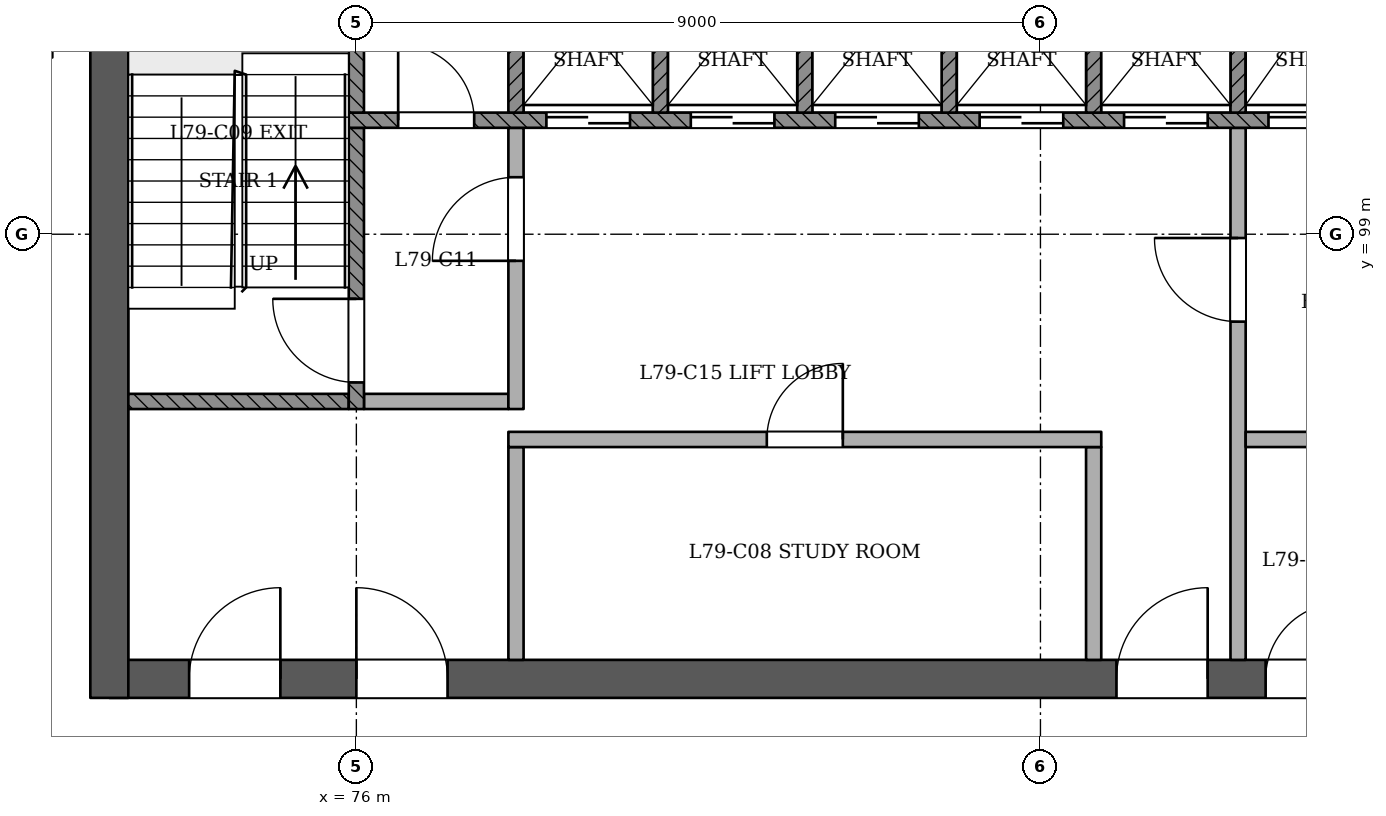
"""IFC4 building model, lengths in metres.
Left out: names, types, materials, properties, quantities, classifications, styles, units other than length and angle.
Written with IfcOpenShell. Run it as: python <this file> out.ifc"""

import sys

from ifc_helpers import new_model, si_unit, direction, frame, frame_2d, origin, place, context, subcontext, project, spatial, rectangle, extrude, element, fill, save


model = new_model("IFC4")
c1 = context("Model", 3, precision=1e-05, world=origin(), true_north=direction((0.0, 1.0)))
c2 = subcontext(c1, "Body", "Model", "MODEL_VIEW")
j1 = project(units=[si_unit("LENGTHUNIT", "METRE"), si_unit("PLANEANGLEUNIT", "RADIAN")], contexts=[c1])
p1 = place(None, origin())
s1 = spatial("IfcSite", under=j1, at=p1, CompositionType="ELEMENT")
p2 = place(p1, origin())
s2 = spatial("IfcBuilding", under=s1, at=p2, CompositionType="ELEMENT")
p3 = place(p2, frame((0.0, 0.0, 305.8)))
s3 = spatial("IfcBuildingStorey", under=s2, at=p3, CompositionType="ELEMENT", Elevation=305.8)
p4 = place(p3, frame((72.75, 93.15, 0.0), z_axis=(0.0, 0.0, 1.0), x_axis=(1.0, 0.0, 0.0)))
e1 = element("IfcWall", 1, at=p4, inside=s3, PredefinedType="SHEAR", context=c2, shape_type="SweptSolid", body=[
    extrude(rectangle(XDim=24.75, YDim=0.5, at=frame_2d((12.375, 0.0))), origin(), (0.0, 0.0, 1.0), 3.6),
])
p5 = place(p4, frame((1.05, 0.0, 0.0)))
e2 = element("IfcOpeningElement", 2, at=p5, cuts=e1, PredefinedType="OPENING", context=c2, shape_type="SweptSolid", body=[
    extrude(rectangle(XDim=1.2, YDim=2.1, at=frame_2d((0.6, 1.05))), frame((0.0, 0.26, 0.0), z_axis=(0.0, -1.0, 0.0), x_axis=(1.0, 0.0, 0.0)), (0.0, 0.0, 1.0), 0.521),
])
p6 = place(p4, frame((3.25, 0.0, 0.0)))
e3 = element("IfcOpeningElement", 3, at=p6, cuts=e1, PredefinedType="OPENING", context=c2, shape_type="SweptSolid", body=[
    extrude(rectangle(XDim=1.2, YDim=2.1, at=frame_2d((0.6, 1.05))), frame((0.0, 0.26, 0.0), z_axis=(0.0, -1.0, 0.0), x_axis=(1.0, 0.0, 0.0)), (0.0, 0.0, 1.0), 0.521),
])
p7 = place(p4, frame((13.25, 0.0, 0.0)))
e4 = element("IfcOpeningElement", 4, at=p7, cuts=e1, PredefinedType="OPENING", context=c2, shape_type="SweptSolid", body=[
    extrude(rectangle(XDim=1.2, YDim=2.1, at=frame_2d((0.6, 1.05))), frame((0.0, 0.26, 0.0), z_axis=(0.0, -1.0, 0.0), x_axis=(1.0, 0.0, 0.0)), (0.0, 0.0, 1.0), 0.521),
])
p8 = place(p4, frame((15.212, 0.0, 0.0)))
e5 = element("IfcOpeningElement", 5, at=p8, cuts=e1, PredefinedType="OPENING", context=c2, shape_type="SweptSolid", body=[
    extrude(rectangle(XDim=1.0, YDim=2.1, at=frame_2d((0.5, 1.05))), frame((0.0, 0.26, 0.0), z_axis=(0.0, -1.0, 0.0), x_axis=(1.0, 0.0, 0.0)), (0.0, 0.0, 1.0), 0.521),
])
p9 = place(p4, frame((18.05, 0.0, 0.0)))
e6 = element("IfcOpeningElement", 6, at=p9, cuts=e1, PredefinedType="OPENING", context=c2, shape_type="SweptSolid", body=[
    extrude(rectangle(XDim=1.0, YDim=2.1, at=frame_2d((0.5, 1.05))), frame((0.0, 0.26, 0.0), z_axis=(0.0, -1.0, 0.0), x_axis=(1.0, 0.0, 0.0)), (0.0, 0.0, 1.0), 0.521),
])
p10 = place(p4, frame((20.95, 0.0, 0.0)))
e7 = element("IfcOpeningElement", 7, at=p10, cuts=e1, PredefinedType="OPENING", context=c2, shape_type="SweptSolid", body=[
    extrude(rectangle(XDim=1.0, YDim=2.1, at=frame_2d((0.5, 1.05))), frame((0.0, 0.26, 0.0), z_axis=(0.0, -1.0, 0.0), x_axis=(1.0, 0.0, 0.0)), (0.0, 0.0, 1.0), 0.521),
])
p11 = place(p4, frame((22.837, 0.0, 0.0)))
e8 = element("IfcOpeningElement", 8, at=p11, cuts=e1, PredefinedType="OPENING", context=c2, shape_type="SweptSolid", body=[
    extrude(rectangle(XDim=1.0, YDim=2.1, at=frame_2d((0.5, 1.05))), frame((0.0, 0.26, 0.0), z_axis=(0.0, -1.0, 0.0), x_axis=(1.0, 0.0, 0.0)), (0.0, 0.0, 1.0), 0.521),
])
p12 = place(p3, frame((72.75, 103.65, 0.0), z_axis=(0.0, 0.0, 1.0), x_axis=(0.0, -1.0, 0.0)))
e9 = element("IfcWall", 9, at=p12, inside=s3, PredefinedType="SHEAR", context=c2, shape_type="SweptSolid", body=[
    extrude(rectangle(XDim=10.75, YDim=0.5, at=frame_2d((5.375, 0.0))), origin(), (0.0, 0.0, 1.0), 3.6),
])
for number, where, z_axis, x_axis in (
    (10, (78.1, 93.4, 0.0), (0.0, 0.0, 1.0), (0.0, 1.0, 0.0)),
    (11, (85.7, 93.4, 0.0), (0.0, 0.0, 1.0), (0.0, 1.0, 0.0)),
):
    element("IfcWall", number, at=place(p3, frame(where, z_axis=z_axis, x_axis=x_axis)), inside=s3, PredefinedType="PARTITIONING", context=c2, shape_type="SweptSolid", body=[
        extrude(rectangle(XDim=2.8, YDim=0.2, at=frame_2d((1.4, 0.0))), origin(), (0.0, 0.0, 1.0), 3.2),
    ])
p13 = place(p3, frame((87.6, 93.4, 0.0), z_axis=(0.0, 0.0, 1.0), x_axis=(0.0, 1.0, 0.0)))
e12 = element("IfcWall", 12, at=p13, inside=s3, PredefinedType="PARTITIONING", context=c2, shape_type="SweptSolid", body=[
    extrude(rectangle(XDim=7.0, YDim=0.2, at=frame_2d((3.5, 0.0))), origin(), (0.0, 0.0, 1.0), 3.2),
])
p14 = place(p13, frame((4.45, 0.0, 0.0)))
e13 = element("IfcOpeningElement", 13, at=p14, cuts=e12, PredefinedType="OPENING", context=c2, shape_type="SweptSolid", body=[
    extrude(rectangle(XDim=1.1, YDim=2.1, at=frame_2d((0.55, 1.05))), frame((0.0, 0.11, 0.0), z_axis=(0.0, -1.0, 0.0), x_axis=(1.0, 0.0, 0.0)), (0.0, 0.0, 1.0), 0.221),
])
p15 = place(p3, frame((78.0, 96.3, 0.0), z_axis=(0.0, 0.0, 1.0), x_axis=(1.0, 0.0, 0.0)))
e14 = element("IfcWall", 14, at=p15, inside=s3, PredefinedType="PARTITIONING", context=c2, shape_type="SweptSolid", body=[
    extrude(rectangle(XDim=7.8, YDim=0.2, at=frame_2d((3.9, 0.0))), origin(), (0.0, 0.0, 1.0), 3.2),
])
p16 = place(p15, frame((3.4, 0.0, 0.0)))
e15 = element("IfcOpeningElement", 15, at=p16, cuts=e14, PredefinedType="OPENING", context=c2, shape_type="SweptSolid", body=[
    extrude(rectangle(XDim=1.0, YDim=2.1, at=frame_2d((0.5, 1.05))), frame((0.0, 0.11, 0.0), z_axis=(0.0, -1.0, 0.0), x_axis=(1.0, 0.0, 0.0)), (0.0, 0.0, 1.0), 0.221),
])
p17 = place(p3, frame((87.7, 96.3, 0.0), z_axis=(0.0, 0.0, 1.0), x_axis=(1.0, 0.0, 0.0)))
e16 = element("IfcWall", 16, at=p17, inside=s3, PredefinedType="PARTITIONING", context=c2, shape_type="SweptSolid", body=[
    extrude(rectangle(XDim=3.6, YDim=0.2, at=frame_2d((1.8, 0.0))), origin(), (0.0, 0.0, 1.0), 3.2),
])
p18 = place(p3, frame((73.0, 96.8, 0.0), z_axis=(0.0, 0.0, 1.0), x_axis=(1.0, 0.0, 0.0)))
e17 = element("IfcWall", 17, at=p18, inside=s3, PredefinedType="SOLIDWALL", context=c2, shape_type="SweptSolid", body=[
    extrude(rectangle(XDim=2.9, YDim=0.2, at=frame_2d((1.45, 0.0))), origin(), (0.0, 0.0, 1.0), 3.2),
])
p19 = place(p3, frame((76.0, 96.7, 0.0), z_axis=(0.0, 0.0, 1.0), x_axis=(0.0, 1.0, 0.0)))
e18 = element("IfcWall", 18, at=p19, inside=s3, PredefinedType="SOLIDWALL", context=c2, shape_type="SweptSolid", body=[
    extrude(rectangle(XDim=3.7, YDim=0.2, at=frame_2d((1.85, 0.0))), origin(), (0.0, 0.0, 1.0), 3.2),
])
p20 = place(p19, frame((0.35, 0.0, 0.0)))
e19 = element("IfcOpeningElement", 19, at=p20, cuts=e18, PredefinedType="OPENING", context=c2, shape_type="SweptSolid", body=[
    extrude(rectangle(XDim=1.1, YDim=2.1, at=frame_2d((0.55, 1.05))), frame((0.0, 0.11, 0.0), z_axis=(0.0, -1.0, 0.0), x_axis=(1.0, 0.0, 0.0)), (0.0, 0.0, 1.0), 0.221),
])
p21 = place(p3, frame((76.1, 96.8, 0.0), z_axis=(0.0, 0.0, 1.0), x_axis=(1.0, 0.0, 0.0)))
e20 = element("IfcWall", 20, at=p21, inside=s3, PredefinedType="PARTITIONING", context=c2, shape_type="SweptSolid", body=[
    extrude(rectangle(XDim=1.9, YDim=0.2, at=frame_2d((0.95, 0.0))), origin(), (0.0, 0.0, 1.0), 3.2),
])
p22 = place(p3, frame((78.1, 96.7, 0.0), z_axis=(0.0, 0.0, 1.0), x_axis=(0.0, 1.0, 0.0)))
e21 = element("IfcWall", 21, at=p22, inside=s3, PredefinedType="PARTITIONING", context=c2, shape_type="SweptSolid", body=[
    extrude(rectangle(XDim=3.7, YDim=0.2, at=frame_2d((1.85, 0.0))), origin(), (0.0, 0.0, 1.0), 3.2),
])
p23 = place(p22, frame((1.95, 0.0, 0.0)))
e22 = element("IfcOpeningElement", 22, at=p23, cuts=e21, PredefinedType="OPENING", context=c2, shape_type="SweptSolid", body=[
    extrude(rectangle(XDim=1.1, YDim=2.1, at=frame_2d((0.55, 1.05))), frame((0.0, 0.11, 0.0), z_axis=(0.0, -1.0, 0.0), x_axis=(1.0, 0.0, 0.0)), (0.0, 0.0, 1.0), 0.221),
])
p24 = place(p3, frame((75.9, 100.5, 0.0), z_axis=(0.0, 0.0, 1.0), x_axis=(1.0, 0.0, 0.0)))
e23 = element("IfcWall", 23, at=p24, inside=s3, PredefinedType="SOLIDWALL", context=c2, shape_type="SweptSolid", body=[
    extrude(rectangle(XDim=18.2, YDim=0.2, at=frame_2d((9.1, 0.0))), origin(), (0.0, 0.0, 1.0), 3.2),
])
p25 = place(p24, frame((2.6, 0.0, 0.0)))
e24 = element("IfcOpeningElement", 24, at=p25, cuts=e23, PredefinedType="OPENING", context=c2, shape_type="SweptSolid", body=[
    extrude(rectangle(XDim=1.1, YDim=2.1, at=frame_2d((0.55, 1.05))), frame((0.0, 0.11, 0.0), z_axis=(0.0, -1.0, 0.0), x_axis=(1.0, 0.0, 0.0)), (0.0, 0.0, 1.0), 0.221),
])
p26 = place(p24, frame((4.5, 0.0, 0.0)))
e25 = element("IfcOpeningElement", 25, at=p26, cuts=e23, PredefinedType="OPENING", context=c2, shape_type="SweptSolid", body=[
    extrude(rectangle(XDim=1.1, YDim=2.1, at=frame_2d((0.55, 1.05))), frame((0.0, 0.11, 0.0), z_axis=(0.0, -1.0, 0.0), x_axis=(1.0, 0.0, 0.0)), (0.0, 0.0, 1.0), 0.221),
])
p27 = place(p24, frame((6.4, 0.0, 0.0)))
e26 = element("IfcOpeningElement", 26, at=p27, cuts=e23, PredefinedType="OPENING", context=c2, shape_type="SweptSolid", body=[
    extrude(rectangle(XDim=1.1, YDim=2.1, at=frame_2d((0.55, 1.05))), frame((0.0, 0.11, 0.0), z_axis=(0.0, -1.0, 0.0), x_axis=(1.0, 0.0, 0.0)), (0.0, 0.0, 1.0), 0.221),
])
p28 = place(p24, frame((8.3, 0.0, 0.0)))
e27 = element("IfcOpeningElement", 27, at=p28, cuts=e23, PredefinedType="OPENING", context=c2, shape_type="SweptSolid", body=[
    extrude(rectangle(XDim=1.1, YDim=2.1, at=frame_2d((0.55, 1.05))), frame((0.0, 0.11, 0.0), z_axis=(0.0, -1.0, 0.0), x_axis=(1.0, 0.0, 0.0)), (0.0, 0.0, 1.0), 0.221),
])
p29 = place(p24, frame((10.2, 0.0, 0.0)))
e28 = element("IfcOpeningElement", 28, at=p29, cuts=e23, PredefinedType="OPENING", context=c2, shape_type="SweptSolid", body=[
    extrude(rectangle(XDim=1.1, YDim=2.1, at=frame_2d((0.55, 1.05))), frame((0.0, 0.11, 0.0), z_axis=(0.0, -1.0, 0.0), x_axis=(1.0, 0.0, 0.0)), (0.0, 0.0, 1.0), 0.221),
])
p30 = place(p24, frame((12.1, 0.0, 0.0)))
e29 = element("IfcOpeningElement", 29, at=p30, cuts=e23, PredefinedType="OPENING", context=c2, shape_type="SweptSolid", body=[
    extrude(rectangle(XDim=1.1, YDim=2.1, at=frame_2d((0.55, 1.05))), frame((0.0, 0.11, 0.0), z_axis=(0.0, -1.0, 0.0), x_axis=(1.0, 0.0, 0.0)), (0.0, 0.0, 1.0), 0.221),
])
p31 = place(p24, frame((14.0, 0.0, 0.0)))
e30 = element("IfcOpeningElement", 30, at=p31, cuts=e23, PredefinedType="OPENING", context=c2, shape_type="SweptSolid", body=[
    extrude(rectangle(XDim=1.1, YDim=2.1, at=frame_2d((0.55, 1.05))), frame((0.0, 0.11, 0.0), z_axis=(0.0, -1.0, 0.0), x_axis=(1.0, 0.0, 0.0)), (0.0, 0.0, 1.0), 0.221),
])
p32 = place(p24, frame((0.65, 0.0, 0.0)))
e31 = element("IfcOpeningElement", 31, at=p32, cuts=e23, PredefinedType="OPENING", context=c2, shape_type="SweptSolid", body=[
    extrude(rectangle(XDim=1.0, YDim=2.1, at=frame_2d((0.5, 1.05))), frame((0.0, 0.11, 0.0), z_axis=(0.0, -1.0, 0.0), x_axis=(1.0, 0.0, 0.0)), (0.0, 0.0, 1.0), 0.221),
])
p33 = place(p24, frame((16.3, 0.0, 0.0)))
e32 = element("IfcOpeningElement", 32, at=p33, cuts=e23, PredefinedType="OPENING", context=c2, shape_type="SweptSolid", body=[
    extrude(rectangle(XDim=1.0, YDim=2.1, at=frame_2d((0.5, 1.05))), frame((0.0, 0.11, 0.0), z_axis=(0.0, -1.0, 0.0), x_axis=(1.0, 0.0, 0.0)), (0.0, 0.0, 1.0), 0.221),
])
for number, where, z_axis, x_axis in (
    (33, (76.0, 100.6, 0.0), (0.0, 0.0, 1.0), (0.0, 1.0, 0.0)),
    (34, (78.1, 100.6, 0.0), (0.0, 0.0, 1.0), (0.0, 1.0, 0.0)),
    (35, (80.0, 100.6, 0.0), (0.0, 0.0, 1.0), (0.0, 1.0, 0.0)),
    (36, (81.9, 100.6, 0.0), (0.0, 0.0, 1.0), (0.0, 1.0, 0.0)),
    (37, (83.8, 100.6, 0.0), (0.0, 0.0, 1.0), (0.0, 1.0, 0.0)),
    (38, (85.7, 100.6, 0.0), (0.0, 0.0, 1.0), (0.0, 1.0, 0.0)),
    (39, (87.6, 100.6, 0.0), (0.0, 0.0, 1.0), (0.0, 1.0, 0.0)),
):
    element("IfcWall", number, at=place(p3, frame(where, z_axis=z_axis, x_axis=x_axis)), inside=s3, PredefinedType="SOLIDWALL", context=c2, shape_type="SweptSolid", body=[
        extrude(rectangle(XDim=2.8, YDim=0.2, at=frame_2d((1.4, 0.0))), origin(), (0.0, 0.0, 1.0), 3.2),
    ])
p34 = place(p25, origin())
e40 = element("IfcDoor", 40, at=p34, inside=s3, OperationType="SLIDING_TO_RIGHT", PredefinedType="NOTDEFINED", context=c2, shape_type="SweptSolid", body=[
    extrude(rectangle(XDim=1.1, YDim=2.1, at=frame_2d((0.55, 1.05))), frame((0.0, 0.025, 0.0), z_axis=(0.0, -1.0, 0.0), x_axis=(1.0, 0.0, 0.0)), (0.0, 0.0, 1.0), 0.05),
])
fill(e24, e40)
p35 = place(p26, origin())
e41 = element("IfcDoor", 41, at=p35, inside=s3, OperationType="SLIDING_TO_LEFT", PredefinedType="NOTDEFINED", context=c2, shape_type="SweptSolid", body=[
    extrude(rectangle(XDim=1.1, YDim=2.1, at=frame_2d((0.55, 1.05))), frame((0.0, 0.025, 0.0), z_axis=(0.0, -1.0, 0.0), x_axis=(1.0, 0.0, 0.0)), (0.0, 0.0, 1.0), 0.05),
])
fill(e25, e41)
p36 = place(p27, origin())
e42 = element("IfcDoor", 42, at=p36, inside=s3, OperationType="SLIDING_TO_RIGHT", PredefinedType="NOTDEFINED", context=c2, shape_type="SweptSolid", body=[
    extrude(rectangle(XDim=1.1, YDim=2.1, at=frame_2d((0.55, 1.05))), frame((0.0, 0.025, 0.0), z_axis=(0.0, -1.0, 0.0), x_axis=(1.0, 0.0, 0.0)), (0.0, 0.0, 1.0), 0.05),
])
fill(e26, e42)
p37 = place(p28, origin())
e43 = element("IfcDoor", 43, at=p37, inside=s3, OperationType="SLIDING_TO_LEFT", PredefinedType="NOTDEFINED", context=c2, shape_type="SweptSolid", body=[
    extrude(rectangle(XDim=1.1, YDim=2.1, at=frame_2d((0.55, 1.05))), frame((0.0, 0.025, 0.0), z_axis=(0.0, -1.0, 0.0), x_axis=(1.0, 0.0, 0.0)), (0.0, 0.0, 1.0), 0.05),
])
fill(e27, e43)
p38 = place(p29, origin())
e44 = element("IfcDoor", 44, at=p38, inside=s3, OperationType="SLIDING_TO_RIGHT", PredefinedType="NOTDEFINED", context=c2, shape_type="SweptSolid", body=[
    extrude(rectangle(XDim=1.1, YDim=2.1, at=frame_2d((0.55, 1.05))), frame((0.0, 0.025, 0.0), z_axis=(0.0, -1.0, 0.0), x_axis=(1.0, 0.0, 0.0)), (0.0, 0.0, 1.0), 0.05),
])
fill(e28, e44)
p39 = place(p30, origin())
e45 = element("IfcDoor", 45, at=p39, inside=s3, OperationType="SLIDING_TO_RIGHT", PredefinedType="NOTDEFINED", context=c2, shape_type="SweptSolid", body=[
    extrude(rectangle(XDim=1.1, YDim=2.1, at=frame_2d((0.55, 1.05))), frame((0.0, 0.025, 0.0), z_axis=(0.0, -1.0, 0.0), x_axis=(1.0, 0.0, 0.0)), (0.0, 0.0, 1.0), 0.05),
])
fill(e29, e45)
p40 = place(p20, origin())
e46 = element("IfcDoor", 46, at=p40, inside=s3, OperationType="SINGLE_SWING_RIGHT", PredefinedType="NOTDEFINED", context=c2, shape_type="SweptSolid", body=[
    extrude(rectangle(XDim=1.1, YDim=2.1, at=frame_2d((0.55, 1.05))), frame((0.0, 0.025, 0.0), z_axis=(0.0, -1.0, 0.0), x_axis=(1.0, 0.0, 0.0)), (0.0, 0.0, 1.0), 0.05),
])
fill(e19, e46)
p41 = place(p23, origin())
e47 = element("IfcDoor", 47, at=p41, inside=s3, OperationType="SINGLE_SWING_LEFT", PredefinedType="NOTDEFINED", context=c2, shape_type="SweptSolid", body=[
    extrude(rectangle(XDim=1.1, YDim=2.1, at=frame_2d((0.55, 1.05))), frame((0.0, 0.025, 0.0), z_axis=(0.0, -1.0, 0.0), x_axis=(1.0, 0.0, 0.0)), (0.0, 0.0, 1.0), 0.05),
])
fill(e22, e47)
p42 = place(p14, origin())
e48 = element("IfcDoor", 48, at=p42, inside=s3, OperationType="SINGLE_SWING_RIGHT", PredefinedType="NOTDEFINED", context=c2, shape_type="SweptSolid", body=[
    extrude(rectangle(XDim=1.1, YDim=2.1, at=frame_2d((0.55, 1.05))), frame((0.0, 0.025, 0.0), z_axis=(0.0, -1.0, 0.0), x_axis=(1.0, 0.0, 0.0)), (0.0, 0.0, 1.0), 0.05),
])
fill(e13, e48)
p43 = place(p5, origin())
e49 = element("IfcDoor", 49, at=p43, inside=s3, OperationType="SINGLE_SWING_RIGHT", PredefinedType="NOTDEFINED", context=c2, shape_type="SweptSolid", body=[
    extrude(rectangle(XDim=1.2, YDim=2.1, at=frame_2d((0.6, 1.05))), frame((0.0, 0.025, 0.0), z_axis=(0.0, -1.0, 0.0), x_axis=(1.0, 0.0, 0.0)), (0.0, 0.0, 1.0), 0.05),
])
fill(e2, e49)
p44 = place(p6, origin())
e50 = element("IfcDoor", 50, at=p44, inside=s3, OperationType="SINGLE_SWING_LEFT", PredefinedType="NOTDEFINED", context=c2, shape_type="SweptSolid", body=[
    extrude(rectangle(XDim=1.2, YDim=2.1, at=frame_2d((0.6, 1.05))), frame((0.0, 0.025, 0.0), z_axis=(0.0, -1.0, 0.0), x_axis=(1.0, 0.0, 0.0)), (0.0, 0.0, 1.0), 0.05),
])
fill(e3, e50)
p45 = place(p7, origin())
e51 = element("IfcDoor", 51, at=p45, inside=s3, OperationType="SINGLE_SWING_RIGHT", PredefinedType="NOTDEFINED", context=c2, shape_type="SweptSolid", body=[
    extrude(rectangle(XDim=1.2, YDim=2.1, at=frame_2d((0.6, 1.05))), frame((0.0, 0.025, 0.0), z_axis=(0.0, -1.0, 0.0), x_axis=(1.0, 0.0, 0.0)), (0.0, 0.0, 1.0), 0.05),
])
fill(e4, e51)
p46 = place(p32, origin())
e52 = element("IfcDoor", 52, at=p46, inside=s3, OperationType="SINGLE_SWING_LEFT", PredefinedType="NOTDEFINED", context=c2, shape_type="SweptSolid", body=[
    extrude(rectangle(XDim=1.0, YDim=2.1, at=frame_2d((0.5, 1.05))), frame((0.0, 0.025, 0.0), z_axis=(0.0, -1.0, 0.0), x_axis=(1.0, 0.0, 0.0)), (0.0, 0.0, 1.0), 0.05),
])
fill(e31, e52)
p47 = place(p8, origin())
e53 = element("IfcDoor", 53, at=p47, inside=s3, OperationType="SINGLE_SWING_RIGHT", PredefinedType="NOTDEFINED", context=c2, shape_type="SweptSolid", body=[
    extrude(rectangle(XDim=1.0, YDim=2.1, at=frame_2d((0.5, 1.05))), frame((0.0, 0.025, 0.0), z_axis=(0.0, -1.0, 0.0), x_axis=(1.0, 0.0, 0.0)), (0.0, 0.0, 1.0), 0.05),
])
fill(e5, e53)
p48 = place(p16, origin())
e54 = element("IfcDoor", 54, at=p48, inside=s3, OperationType="SINGLE_SWING_RIGHT", PredefinedType="NOTDEFINED", context=c2, shape_type="SweptSolid", body=[
    extrude(rectangle(XDim=1.0, YDim=2.1, at=frame_2d((0.5, 1.05))), frame((0.0, 0.025, 0.0), z_axis=(0.0, -1.0, 0.0), x_axis=(1.0, 0.0, 0.0)), (0.0, 0.0, 1.0), 0.05),
])
fill(e15, e54)
save(model, sys.argv[1])
